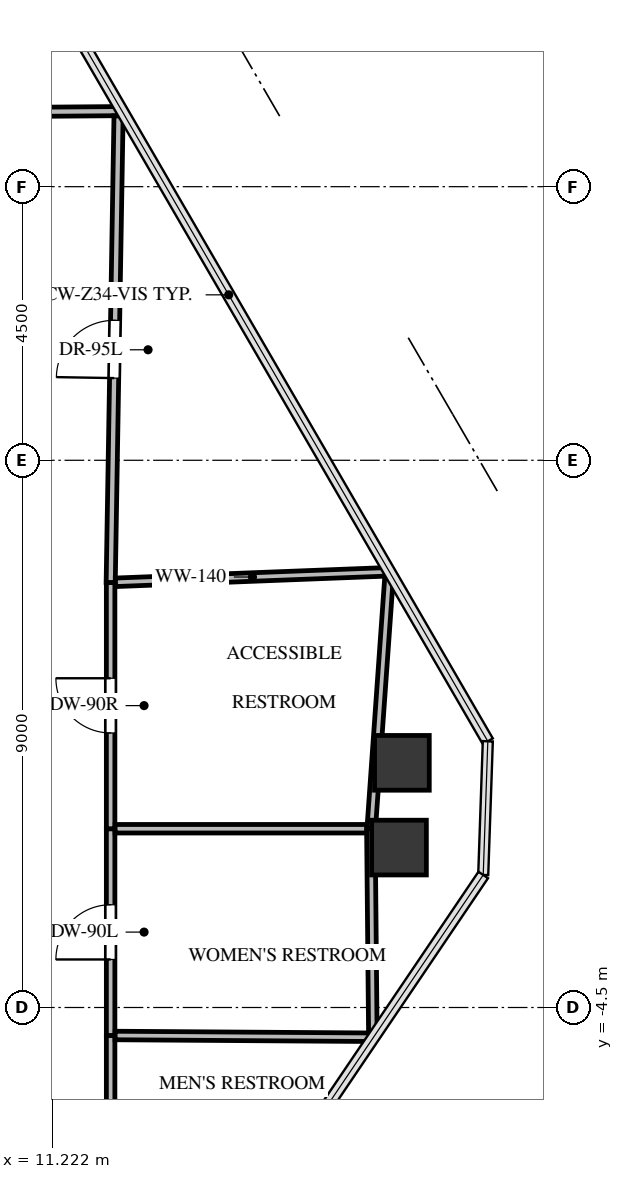
"""IFC4 building model, lengths in metres.
Left out: names, types, materials, properties, quantities, classifications, styles, units other than length and angle.
Written with IfcOpenShell. Run it as: python <this file> out.ifc"""

import sys

from ifc_helpers import new_model, si_unit, direction, frame, frame_2d, origin, origin_2d, place, context, subcontext, project, spatial, rectangle, extrude, source, transform, mapped, element, fill, save


model = new_model("IFC4")
c1 = context("Model", 3, precision=1e-05, world=origin(), true_north=direction((0.0, 1.0)))
c2 = subcontext(c1, "Body", "Model", "MODEL_VIEW")
j1 = project(units=[si_unit("LENGTHUNIT", "METRE"), si_unit("PLANEANGLEUNIT", "RADIAN")], contexts=[c1])
p1 = place(None, origin())
s1 = spatial("IfcSite", under=j1, at=p1, CompositionType="ELEMENT")
p2 = place(p1, origin())
s2 = spatial("IfcBuilding", under=s1, at=p2, CompositionType="ELEMENT")
p3 = place(p2, frame((0.0, 0.0, 238.1)))
s3 = spatial("IfcBuildingStorey", under=s2, at=p3, CompositionType="ELEMENT", Elevation=238.1)
m1 = source(origin(), c2, "Body", "SweptSolid", [
    extrude(rectangle(XDim=0.9, YDim=0.9, at=origin_2d()), origin(), (0.0, 0.0, 1.0), 3.3),
])
for number, where, z_axis, x_axis in (
    (1, (16.97, -0.476, -0.24), (0.0, 0.0, 1.0), (1.0, 0.0, 0.0)),
    (2, (16.922, -1.87, -0.24), (0.0, 0.0, 1.0), (1.0, 0.0, 0.0)),
):
    element("IfcColumn", number, at=place(p3, frame(where, z_axis=z_axis, x_axis=x_axis)), inside=s3, PredefinedType="COLUMN", context=c2, shape_type="MappedRepresentation", body=[
        mapped(m1, transform((0.0, 0.0, 0.0), x_axis=(1.0, 0.0, 0.0), y_axis=(0.0, 1.0, 0.0), z_axis=(0.0, 0.0, 1.0), scale=1.0)),
    ])
p4 = place(p3, frame((12.18, -8.44, 0.0), z_axis=(0.0, 0.0, 1.0), x_axis=(0.0, 1.0, 0.0)))
e3 = element("IfcWall", 3, at=p4, inside=s3, PredefinedType="PARTITIONING", context=c2, shape_type="SweptSolid", body=[
    extrude(rectangle(XDim=3.48, YDim=0.14, at=frame_2d((1.74, 0.0))), origin(), (0.0, 0.0, 1.0), 2.399),
])
p5 = place(p4, frame((1.29, 0.0, 0.0)))
e4 = element("IfcOpeningElement", 4, at=p5, cuts=e3, PredefinedType="OPENING", context=c2, shape_type="SweptSolid", body=[
    extrude(rectangle(XDim=0.9, YDim=2.05, at=frame_2d((0.45, 1.025))), frame((0.0, 0.08, 0.0), z_axis=(0.0, -1.0, 0.0), x_axis=(1.0, 0.0, 0.0)), (0.0, 0.0, 1.0), 0.16),
])
p6 = place(p3, frame((12.18, -4.96, 0.0), z_axis=(0.0, 0.0, 1.0), x_axis=(0.0, 1.0, 0.0)))
e5 = element("IfcWall", 5, at=p6, inside=s3, PredefinedType="PARTITIONING", context=c2, shape_type="SweptSolid", body=[
    extrude(rectangle(XDim=3.4, YDim=0.14, at=frame_2d((1.7, 0.0))), origin(), (0.0, 0.0, 1.0), 3.045),
])
p7 = place(p6, frame((1.25, 0.0, 0.0)))
e6 = element("IfcOpeningElement", 6, at=p7, cuts=e5, PredefinedType="OPENING", context=c2, shape_type="SweptSolid", body=[
    extrude(rectangle(XDim=0.9, YDim=2.05, at=frame_2d((0.45, 1.025))), frame((0.0, 0.08, 0.0), z_axis=(0.0, -1.0, 0.0), x_axis=(1.0, 0.0, 0.0)), (0.0, 0.0, 1.0), 0.16),
])
p8 = place(p3, frame((12.18, -1.56, 0.0), z_axis=(0.0, 0.0, 1.0), x_axis=(0.0, 1.0, 0.0)))
e7 = element("IfcWall", 7, at=p8, inside=s3, PredefinedType="PARTITIONING", context=c2, shape_type="SweptSolid", body=[
    extrude(rectangle(XDim=4.05, YDim=0.14, at=frame_2d((2.025, 0.0))), origin(), (0.0, 0.0, 1.0), 2.301),
])
p9 = place(p8, frame((1.575, 0.0, 0.0)))
e8 = element("IfcOpeningElement", 8, at=p9, cuts=e7, PredefinedType="OPENING", context=c2, shape_type="SweptSolid", body=[
    extrude(rectangle(XDim=0.9, YDim=2.05, at=frame_2d((0.45, 1.025))), frame((0.0, 0.08, 0.0), z_axis=(0.0, -1.0, 0.0), x_axis=(1.0, 0.0, 0.0)), (0.0, 0.0, 1.0), 0.16),
])
p10 = place(p3, frame((12.368, 10.243, 0.0), z_axis=(0.0, 0.0, 1.0), x_axis=(-0.999968379606, -0.007952344825, 0.0)))
e9 = element("IfcWall", 9, at=p10, inside=s3, PredefinedType="PARTITIONING", context=c2, shape_type="SweptSolid", body=[
    extrude(rectangle(XDim=7.829, YDim=0.15, at=frame_2d((3.914, 0.0))), origin(), (0.0, 0.0, 1.0), 2.301),
])
p11 = place(p10, frame((3.439, 0.0, 0.0)))
e10 = element("IfcOpeningElement", 10, at=p11, cuts=e9, PredefinedType="OPENING", context=c2, shape_type="SweptSolid", body=[
    extrude(rectangle(XDim=0.95, YDim=2.1, at=frame_2d((0.475, 1.05))), frame((0.0, 0.085, 0.0), z_axis=(0.0, -1.0, 0.0), x_axis=(1.0, 0.0, 0.0)), (0.0, 0.0, 1.0), 0.17),
])
p12 = place(p3, frame((12.181, 2.49, 0.0), z_axis=(0.0, 0.0, 1.0), x_axis=(0.016828669653, 0.999858387912, 0.0)))
e11 = element("IfcWall", 11, at=p12, inside=s3, PredefinedType="PARTITIONING", context=c2, shape_type="SweptSolid", body=[
    extrude(rectangle(XDim=7.674, YDim=0.15, at=frame_2d((3.837, 0.0))), origin(), (0.0, 0.0, 1.0), 2.399),
])
p13 = place(p12, frame((3.362, 0.0, 0.0)))
e12 = element("IfcOpeningElement", 12, at=p13, cuts=e11, PredefinedType="OPENING", context=c2, shape_type="SweptSolid", body=[
    extrude(rectangle(XDim=0.95, YDim=2.1, at=frame_2d((0.475, 1.05))), frame((0.0, 0.085, 0.0), z_axis=(0.0, -1.0, 0.0), x_axis=(1.0, 0.0, 0.0)), (0.0, 0.0, 1.0), 0.17),
])
p14 = place(p3, frame((12.254, -4.96, 0.0), z_axis=(0.0, 0.0, 1.0), x_axis=(0.999976630429, -0.006836563198, 0.0)))
e13 = element("IfcWall", 13, at=p14, inside=s3, PredefinedType="PARTITIONING", context=c2, shape_type="SweptSolid", body=[
    extrude(rectangle(XDim=4.25, YDim=0.14, at=frame_2d((2.125, 0.0))), origin(), (0.0, 0.0, 1.0), 2.399),
])
p15 = place(p3, frame((12.254, -1.56, 0.0), z_axis=(0.0, 0.0, 1.0), x_axis=(1.0, 0.0, 0.0)))
e14 = element("IfcWall", 14, at=p15, inside=s3, PredefinedType="PARTITIONING", context=c2, shape_type="SweptSolid", body=[
    extrude(rectangle(XDim=4.206, YDim=0.14, at=frame_2d((2.103, 0.0))), origin(), (0.0, 0.0, 1.0), 2.301),
])
p16 = place(p3, frame((16.46, -1.56, 0.0), z_axis=(0.0, 0.0, 1.0), x_axis=(0.009604446748, -0.999953876238, 0.0)))
e15 = element("IfcWall", 15, at=p16, inside=s3, PredefinedType="PARTITIONING", context=c2, shape_type="SweptSolid", body=[
    extrude(rectangle(XDim=3.355, YDim=0.14, at=frame_2d((1.678, 0.0))), origin(), (0.0, 0.0, 1.0), 2.301),
])
p17 = place(p3, frame((12.26, 2.493, 0.0), z_axis=(0.0, 0.0, 1.0), x_axis=(0.999256206289, 0.038562082324, 0.0)))
e16 = element("IfcWall", 16, at=p17, inside=s3, PredefinedType="PARTITIONING", context=c2, shape_type="SweptSolid", body=[
    extrude(rectangle(XDim=4.508, YDim=0.14, at=frame_2d((2.254, 0.0))), origin(), (0.0, 0.0, 1.0), 2.399),
])
p18 = place(p3, frame((16.76, 2.593, 0.0), z_axis=(0.0, 0.0, 1.0), x_axis=(-0.07055102187, -0.997508172053, 0.0)))
e17 = element("IfcWall", 17, at=p18, inside=s3, PredefinedType="PARTITIONING", context=c2, shape_type="SweptSolid", body=[
    extrude(rectangle(XDim=4.163, YDim=0.14, at=frame_2d((2.082, 0.0))), origin(), (0.0, 0.0, 1.0), 2.301),
])
m2 = source(origin(), c2, "Body", "SweptSolid", [
    extrude(rectangle(XDim=0.9, YDim=2.05, at=frame_2d((0.45, 1.025))), frame((0.0, 0.025, 0.0), z_axis=(0.0, -1.0, 0.0), x_axis=(1.0, 0.0, 0.0)), (0.0, 0.0, 1.0), 0.05),
])
p19 = place(p7, origin())
e18 = element("IfcDoor", 18, at=p19, inside=s3, OperationType="SINGLE_SWING_LEFT", PredefinedType="DOOR", context=c2, shape_type="MappedRepresentation", body=[
    mapped(m2, transform((0.0, 0.0, 0.0), x_axis=(1.0, 0.0, 0.0), y_axis=(0.0, 1.0, 0.0), z_axis=(0.0, 0.0, 1.0), scale=1.0)),
])
fill(e6, e18)
m3 = source(origin(), c2, "Body", "SweptSolid", [
    extrude(rectangle(XDim=0.9, YDim=2.05, at=frame_2d((0.45, 1.025))), frame((0.0, 0.025, 0.0), z_axis=(0.0, -1.0, 0.0), x_axis=(1.0, 0.0, 0.0)), (0.0, 0.0, 1.0), 0.05),
])
p20 = place(p9, origin())
e19 = element("IfcDoor", 19, at=p20, inside=s3, OperationType="SINGLE_SWING_RIGHT", PredefinedType="DOOR", context=c2, shape_type="MappedRepresentation", body=[
    mapped(m3, transform((0.0, 0.0, 0.0), x_axis=(1.0, 0.0, 0.0), y_axis=(0.0, 1.0, 0.0), z_axis=(0.0, 0.0, 1.0), scale=1.0)),
])
fill(e8, e19)
m4 = source(origin(), c2, "Body", "SweptSolid", [
    extrude(rectangle(XDim=0.95, YDim=2.1, at=frame_2d((0.475, 1.05))), frame((0.0, 0.025, 0.0), z_axis=(0.0, -1.0, 0.0), x_axis=(1.0, 0.0, 0.0)), (0.0, 0.0, 1.0), 0.05),
])
p21 = place(p13, origin())
e20 = element("IfcDoor", 20, at=p21, inside=s3, OperationType="SINGLE_SWING_LEFT", PredefinedType="DOOR", context=c2, shape_type="MappedRepresentation", body=[
    mapped(m4, transform((0.0, 0.0, 0.0), x_axis=(1.0, 0.0, 0.0), y_axis=(0.0, 1.0, 0.0), z_axis=(0.0, 0.0, 1.0), scale=1.0)),
])
fill(e12, e20)
save(model, sys.argv[1])
